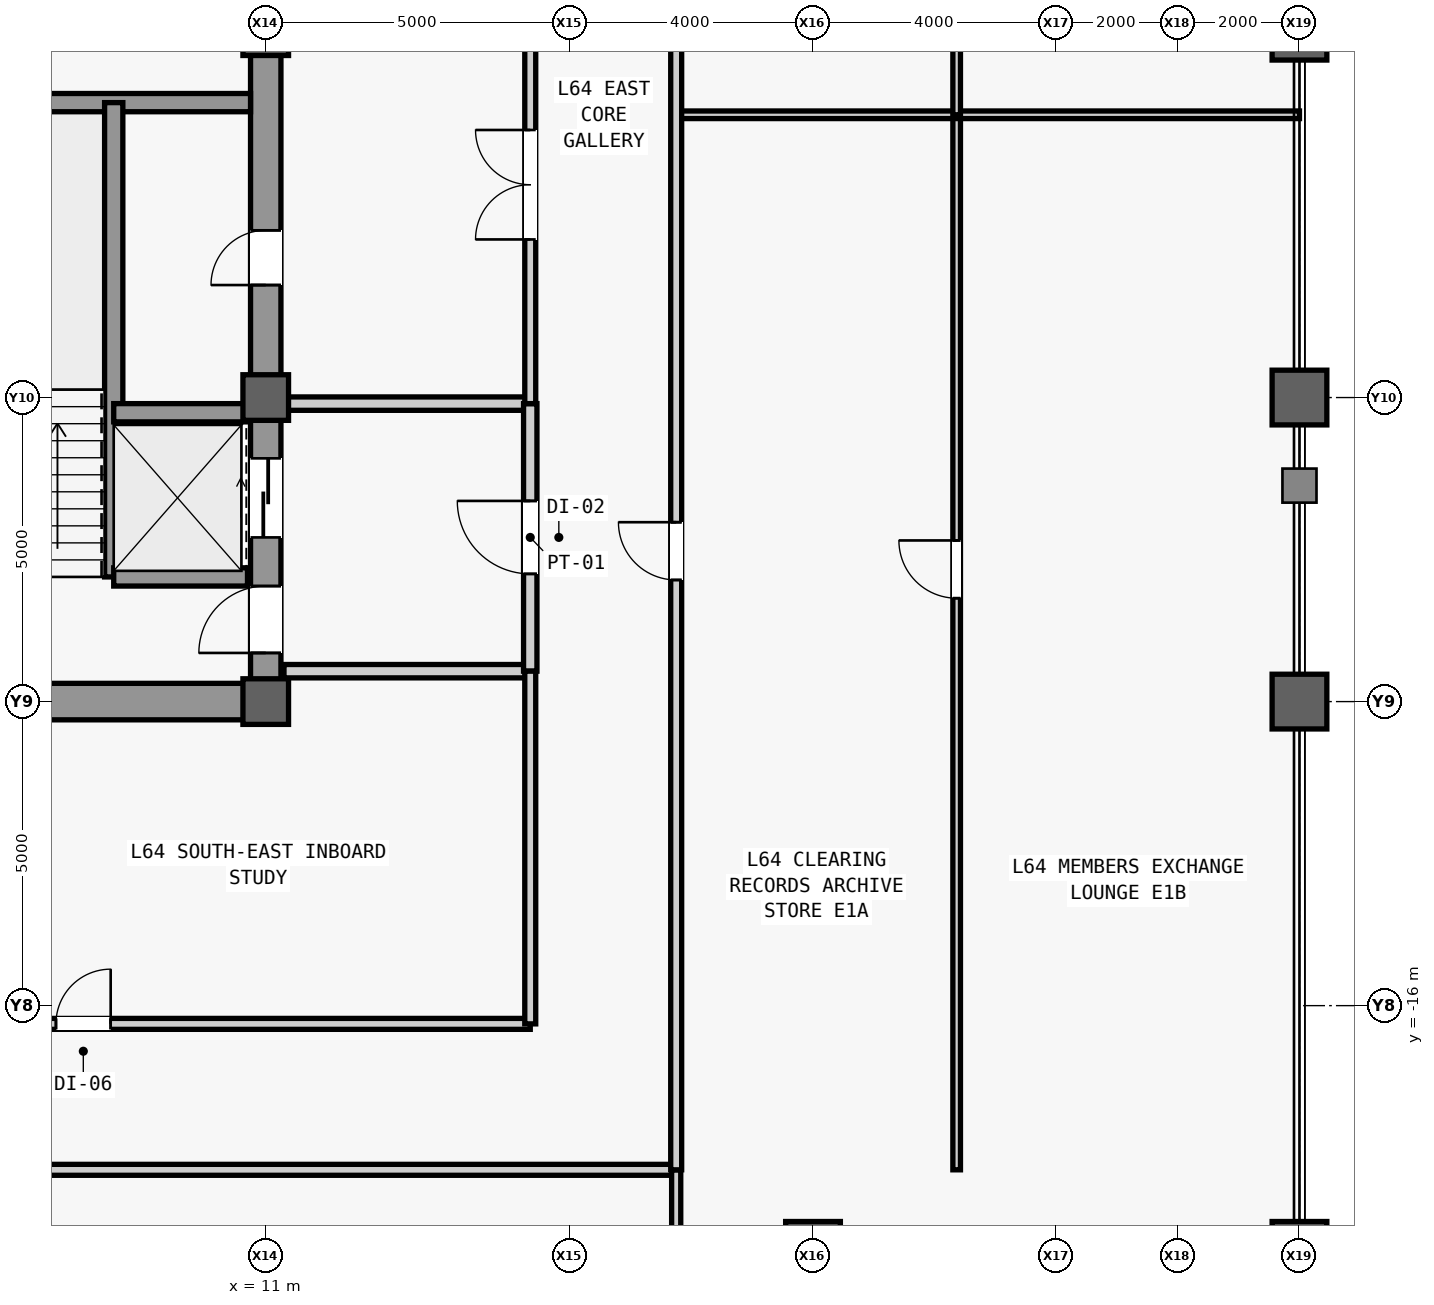
"""IFC4 building model, lengths in metres.
Left out: names, types, materials, properties, quantities, classifications, styles, units other than length and angle.
Written with IfcOpenShell. Run it as: python <this file> out.ifc"""

import sys

from ifc_helpers import new_model, si_unit, direction, frame, frame_2d, origin, origin_2d, place, context, subcontext, project, spatial, rectangle, hollow_rectangle, extrude, source, transform, mapped, element, fill, save


model = new_model("IFC4")
c1 = context("Model", 3, precision=1e-05, world=origin(), true_north=direction((0.0, 1.0)))
c2 = subcontext(c1, "Body", "Model", "MODEL_VIEW")
j1 = project(units=[si_unit("LENGTHUNIT", "METRE"), si_unit("PLANEANGLEUNIT", "RADIAN")], contexts=[c1])
p1 = place(None, origin())
s1 = spatial("IfcSite", under=j1, at=p1, CompositionType="ELEMENT")
p2 = place(p1, origin())
s2 = spatial("IfcBuilding", under=s1, at=p2, CompositionType="ELEMENT")
p3 = place(p2, frame((0.0, 0.0, 273.5)))
s3 = spatial("IfcBuildingStorey", under=s2, at=p3, CompositionType="ELEMENT", Elevation=273.5)
m1 = source(origin(), c2, "Body", "SweptSolid", [
    extrude(rectangle(XDim=22.0, YDim=0.5, at=frame_2d((11.0, 0.0))), origin(), (0.0, 0.0, 1.0), 3.78),
])
p4 = place(p3, frame((11.0, -11.0, 0.0), z_axis=(0.0, 0.0, 1.0), x_axis=(0.0, 1.0, 0.0)))
e1 = element("IfcWall", 1, at=p4, inside=s3, PredefinedType="SHEAR", context=c2, shape_type="MappedRepresentation", body=[
    mapped(m1, transform((0.0, 0.0, 0.0), scale=1.0)),
])
m2 = source(origin(), c2, "Body", "SweptSolid", [
    extrude(rectangle(XDim=1.1, YDim=2.2, at=frame_2d((0.55, 1.1))), frame((0.0, 0.26, 0.0), z_axis=(0.0, -1.0, 0.0), x_axis=(1.0, 0.0, 0.0)), (0.0, 0.0, 1.0), 0.52),
])
p5 = place(p4, frame((0.8, 0.0, 0.0)))
e2 = element("IfcOpeningElement", 2, at=p5, cuts=e1, PredefinedType="OPENING", context=c2, shape_type="MappedRepresentation", body=[
    mapped(m2, transform((0.0, 0.0, 0.0), scale=1.0)),
])
m3 = source(origin(), c2, "Body", "SweptSolid", [
    extrude(rectangle(XDim=0.9, YDim=2.15, at=frame_2d((0.45, 1.075))), frame((0.0, 0.26, 0.0), z_axis=(0.0, -1.0, 0.0), x_axis=(1.0, 0.0, 0.0)), (0.0, 0.0, 1.0), 0.52),
])
p6 = place(p4, frame((6.85, 0.0, 0.0)))
e3 = element("IfcOpeningElement", 3, at=p6, cuts=e1, PredefinedType="OPENING", context=c2, shape_type="MappedRepresentation", body=[
    mapped(m3, transform((0.0, 0.0, 0.0), scale=1.0)),
])
m4 = source(origin(), c2, "Body", "SweptSolid", [
    extrude(rectangle(XDim=1.2, YDim=2.3, at=frame_2d((0.6, 1.15))), frame((0.0, 0.26, 0.0), z_axis=(0.0, -1.0, 0.0), x_axis=(1.0, 0.0, 0.0)), (0.0, 0.0, 1.0), 0.52),
])
p7 = place(p4, frame((17.6, 0.0, 0.0)))
e4 = element("IfcOpeningElement", 4, at=p7, cuts=e1, PredefinedType="OPENING", context=c2, shape_type="MappedRepresentation", body=[
    mapped(m4, transform((0.0, 0.0, 0.0), scale=1.0)),
])
p8 = place(p4, frame((19.6, 0.0, 0.0)))
e5 = element("IfcOpeningElement", 5, at=p8, cuts=e1, PredefinedType="OPENING", context=c2, shape_type="MappedRepresentation", body=[
    mapped(m4, transform((0.0, 0.0, 0.0), scale=1.0)),
])
m5 = source(origin(), c2, "Body", "SweptSolid", [
    extrude(rectangle(XDim=1.3, YDim=2.3, at=frame_2d((0.65, 1.15))), frame((0.0, 0.26, 0.0), z_axis=(0.0, -1.0, 0.0), x_axis=(1.0, 0.0, 0.0)), (0.0, 0.0, 1.0), 0.52),
])
p9 = place(p4, frame((2.7, 0.0, 0.0)))
e6 = element("IfcOpeningElement", 6, at=p9, cuts=e1, PredefinedType="OPENING", context=c2, shape_type="MappedRepresentation", body=[
    mapped(m5, transform((0.0, 0.0, 0.0), scale=1.0)),
])
p10 = place(p4, frame((13.35, 0.0, 0.0)))
e7 = element("IfcOpeningElement", 7, at=p10, cuts=e1, PredefinedType="OPENING", context=c2, shape_type="MappedRepresentation", body=[
    mapped(m5, transform((0.0, 0.0, 0.0), scale=1.0)),
])
m6 = source(origin(), c2, "Body", "SweptSolid", [
    extrude(rectangle(XDim=5.9, YDim=0.6, at=frame_2d((2.95, 0.0))), origin(), (0.0, 0.0, 1.0), 3.78),
])
p11 = place(p3, frame((4.85, -11.0, 0.0), z_axis=(0.0, 0.0, 1.0), x_axis=(1.0, 0.0, 0.0)))
e8 = element("IfcWall", 8, at=p11, inside=s3, PredefinedType="SHEAR", context=c2, shape_type="MappedRepresentation", body=[
    mapped(m6, transform((0.0, 0.0, 0.0), scale=1.0)),
])
m7 = source(origin(), c2, "Body", "SweptSolid", [
    extrude(rectangle(XDim=5.65, YDim=0.3, at=frame_2d((2.825, 0.0))), origin(), (0.0, 0.0, 1.0), 3.78),
])
p12 = place(p3, frame((5.1, -1.15, 0.0), z_axis=(0.0, 0.0, 1.0), x_axis=(1.0, 0.0, 0.0)))
e9 = element("IfcWall", 9, at=p12, inside=s3, PredefinedType="SHEAR", context=c2, shape_type="MappedRepresentation", body=[
    mapped(m7, transform((0.0, 0.0, 0.0), scale=1.0)),
])
m8 = source(origin(), c2, "Body", "SweptSolid", [
    extrude(rectangle(XDim=0.75, YDim=0.75, at=origin_2d()), origin(), (0.0, 0.0, 1.0), 4.0),
])
for number, where, z_axis, x_axis in (
    (10, (11.0, -11.0, 0.0), (0.0, 0.0, 1.0), (1.0, 0.0, 0.0)),
    (11, (11.0, -6.0, 0.0), (0.0, 0.0, 1.0), (1.0, 0.0, 0.0)),
    (12, (11.0, 0.0, 0.0), (0.0, 0.0, 1.0), (1.0, 0.0, 0.0)),
):
    element("IfcColumn", number, at=place(p3, frame(where, z_axis=z_axis, x_axis=x_axis)), inside=s3, PredefinedType="COLUMN", context=c2, shape_type="MappedRepresentation", body=[
        mapped(m8, transform((0.0, 0.0, 0.0), scale=1.0)),
    ])
m9 = source(origin(), c2, "Body", "SweptSolid", [
    extrude(hollow_rectangle(XDim=0.9, YDim=0.9, WallThickness=0.05, at=origin_2d()), origin(), (0.0, 0.0, 1.0), 4.0),
])
for number, where, z_axis, x_axis in (
    (13, (20.0, -20.0, 0.0), (0.0, 0.0, 1.0), (1.0, 0.0, 0.0)),
    (14, (28.0, -20.0, 0.0), (0.0, 0.0, 1.0), (1.0, 0.0, 0.0)),
    (15, (28.0, -11.0, 0.0), (0.0, 0.0, 1.0), (1.0, 0.0, 0.0)),
    (16, (28.0, -6.0, 0.0), (0.0, 0.0, 1.0), (1.0, 0.0, 0.0)),
    (17, (28.0, 0.0, 0.0), (0.0, 0.0, 1.0), (1.0, 0.0, 0.0)),
):
    element("IfcColumn", number, at=place(p3, frame(where, z_axis=z_axis, x_axis=x_axis)), inside=s3, PredefinedType="COLUMN", context=c2, shape_type="MappedRepresentation", body=[
        mapped(m9, transform((0.0, 0.0, 0.0), scale=1.0)),
    ])
m10 = source(origin(), c2, "Body", "SweptSolid", [
    extrude(rectangle(XDim=7.8, YDim=0.3, at=frame_2d((3.9, 0.0))), origin(), (0.0, 0.0, 1.0), 3.78),
])
p13 = place(p3, frame((8.5, -8.95, 0.0), z_axis=(0.0, 0.0, 1.0), x_axis=(0.0, 1.0, 0.0)))
e18 = element("IfcWall", 18, at=p13, inside=s3, PredefinedType="SHEAR", context=c2, shape_type="MappedRepresentation", body=[
    mapped(m10, transform((0.0, 0.0, 0.0), scale=1.0)),
])
m11 = source(origin(), c2, "Body", "SweptSolid", [
    extrude(rectangle(XDim=2.2, YDim=0.3, at=frame_2d((1.1, 0.0))), origin(), (0.0, 0.0, 1.0), 3.78),
])
for number, where, z_axis, x_axis in (
    (19, (8.5, -8.95, 0.0), (0.0, 0.0, 1.0), (1.0, 0.0, 0.0)),
    (20, (8.5, -6.25, 0.0), (0.0, 0.0, 1.0), (1.0, 0.0, 0.0)),
):
    element("IfcWall", number, at=place(p3, frame(where, z_axis=z_axis, x_axis=x_axis)), inside=s3, PredefinedType="SHEAR", context=c2, shape_type="MappedRepresentation", body=[
        mapped(m11, transform((0.0, 0.0, 0.0), scale=1.0)),
    ])
m12 = source(origin(), c2, "Body", "SweptSolid", [
    extrude(rectangle(XDim=4.05, YDim=0.22, at=frame_2d((2.025, 0.0))), origin(), (0.0, 0.0, 1.0), 3.78),
])
p14 = place(p3, frame((11.3, -10.5, 0.0), z_axis=(0.0, 0.0, 1.0), x_axis=(1.0, 0.0, 0.0)))
e21 = element("IfcWall", 21, at=p14, inside=s3, PredefinedType="PARTITIONING", context=c2, shape_type="MappedRepresentation", body=[
    mapped(m12, transform((0.0, 0.0, 0.0), scale=1.0)),
])
m13 = source(origin(), c2, "Body", "SweptSolid", [
    extrude(rectangle(XDim=4.05, YDim=0.22, at=frame_2d((2.025, 0.0))), origin(), (0.0, 0.0, 1.0), 3.085),
])
p15 = place(p3, frame((11.3, -6.1, 0.0), z_axis=(0.0, 0.0, 1.0), x_axis=(1.0, 0.0, 0.0)))
e22 = element("IfcWall", 22, at=p15, inside=s3, PredefinedType="PARTITIONING", context=c2, shape_type="MappedRepresentation", body=[
    mapped(m13, transform((0.0, 0.0, 0.0), scale=1.0)),
])
m14 = source(origin(), c2, "Body", "SweptSolid", [
    extrude(rectangle(XDim=4.4, YDim=0.22, at=frame_2d((2.2, 0.0))), origin(), (0.0, 0.0, 1.0), 3.78),
])
p16 = place(p3, frame((15.35, -10.5, 0.0), z_axis=(0.0, 0.0, 1.0), x_axis=(0.0, 1.0, 0.0)))
e23 = element("IfcWall", 23, at=p16, inside=s3, PredefinedType="PARTITIONING", context=c2, shape_type="MappedRepresentation", body=[
    mapped(m14, transform((0.0, 0.0, 0.0), scale=1.0)),
])
m15 = source(origin(), c2, "Body", "SweptSolid", [
    extrude(rectangle(XDim=1.2, YDim=2.2, at=frame_2d((0.6, 1.1))), frame((0.0, 0.12, 0.0), z_axis=(0.0, -1.0, 0.0), x_axis=(1.0, 0.0, 0.0)), (0.0, 0.0, 1.0), 0.24),
])
p17 = place(p16, frame((1.6, 0.0, 0.0)))
e24 = element("IfcOpeningElement", 24, at=p17, cuts=e23, PredefinedType="OPENING", context=c2, shape_type="MappedRepresentation", body=[
    mapped(m15, transform((0.0, 0.0, 0.0), scale=1.0)),
])
m16 = source(origin(), c2, "Body", "SweptSolid", [
    extrude(rectangle(XDim=16.6, YDim=0.18, at=frame_2d((8.3, 0.0))), origin(), (0.0, 0.0, 1.0), 3.78),
])
p18 = place(p3, frame((15.35, -6.1, 0.0), z_axis=(0.0, 0.0, 1.0), x_axis=(0.0, 1.0, 0.0)))
e25 = element("IfcWall", 25, at=p18, inside=s3, PredefinedType="PARTITIONING", context=c2, shape_type="MappedRepresentation", body=[
    mapped(m16, transform((0.0, 0.0, 0.0), scale=1.0)),
])
m17 = source(origin(), c2, "Body", "SweptSolid", [
    extrude(rectangle(XDim=1.8, YDim=2.25, at=frame_2d((0.9, 1.125))), frame((0.0, 0.1, 0.0), z_axis=(0.0, -1.0, 0.0), x_axis=(1.0, 0.0, 0.0)), (0.0, 0.0, 1.0), 0.2),
])
p19 = place(p18, frame((2.7, 0.0, 0.0)))
e26 = element("IfcOpeningElement", 26, at=p19, cuts=e25, PredefinedType="OPENING", context=c2, shape_type="MappedRepresentation", body=[
    mapped(m17, transform((0.0, 0.0, 0.0), scale=1.0)),
])
p20 = place(p18, frame((13.0, 0.0, 0.0)))
e27 = element("IfcOpeningElement", 27, at=p20, cuts=e25, PredefinedType="OPENING", context=c2, shape_type="MappedRepresentation", body=[
    mapped(m17, transform((0.0, 0.0, 0.0), scale=1.0)),
])
m18 = source(origin(), c2, "Body", "SweptSolid", [
    extrude(rectangle(XDim=14.05, YDim=0.18, at=frame_2d((7.025, 0.0))), origin(), (0.0, 0.0, 1.0), 3.78),
])
p21 = place(p3, frame((1.3, -16.3, 0.0), z_axis=(0.0, 0.0, 1.0), x_axis=(1.0, 0.0, 0.0)))
e28 = element("IfcWall", 28, at=p21, inside=s3, PredefinedType="PARTITIONING", context=c2, shape_type="MappedRepresentation", body=[
    mapped(m18, transform((0.0, 0.0, 0.0), scale=1.0)),
])
m19 = source(origin(), c2, "Body", "SweptSolid", [
    extrude(rectangle(XDim=0.9, YDim=2.15, at=frame_2d((0.45, 1.075))), frame((0.0, 0.1, 0.0), z_axis=(0.0, -1.0, 0.0), x_axis=(1.0, 0.0, 0.0)), (0.0, 0.0, 1.0), 0.2),
])
p22 = place(p21, frame((6.25, 0.0, 0.0)))
e29 = element("IfcOpeningElement", 29, at=p22, cuts=e28, PredefinedType="OPENING", context=c2, shape_type="MappedRepresentation", body=[
    mapped(m19, transform((0.0, 0.0, 0.0), scale=1.0)),
])
m20 = source(origin(), c2, "Body", "SweptSolid", [
    extrude(rectangle(XDim=5.8, YDim=0.18, at=frame_2d((2.9, 0.0))), origin(), (0.0, 0.0, 1.0), 3.78),
])
p23 = place(p3, frame((15.35, -16.3, 0.0), z_axis=(0.0, 0.0, 1.0), x_axis=(0.0, 1.0, 0.0)))
e30 = element("IfcWall", 30, at=p23, inside=s3, PredefinedType="PARTITIONING", context=c2, shape_type="MappedRepresentation", body=[
    mapped(m20, transform((0.0, 0.0, 0.0), scale=1.0)),
])
m21 = source(origin(), c2, "Body", "SweptSolid", [
    extrude(rectangle(XDim=37.55, YDim=0.18, at=frame_2d((18.775, 0.0))), origin(), (0.0, 0.0, 1.0), 3.78),
])
p24 = place(p3, frame((-19.8, -18.7, 0.0), z_axis=(0.0, 0.0, 1.0), x_axis=(1.0, 0.0, 0.0)))
e31 = element("IfcWall", 31, at=p24, inside=s3, PredefinedType="PARTITIONING", context=c2, shape_type="MappedRepresentation", body=[
    mapped(m21, transform((0.0, 0.0, 0.0), scale=1.0)),
])
m22 = source(origin(), c2, "Body", "SweptSolid", [
    extrude(rectangle(XDim=1.05, YDim=2.2, at=frame_2d((0.525, 1.1))), frame((0.0, 0.1, 0.0), z_axis=(0.0, -1.0, 0.0), x_axis=(1.0, 0.0, 0.0)), (0.0, 0.0, 1.0), 0.2),
])
p25 = place(p24, frame((7.11, 0.0, 0.0)))
e32 = element("IfcOpeningElement", 32, at=p25, cuts=e31, PredefinedType="OPENING", context=c2, shape_type="MappedRepresentation", body=[
    mapped(m22, transform((0.0, 0.0, 0.0), scale=1.0)),
])
p26 = place(p24, frame((24.86, 0.0, 0.0)))
e33 = element("IfcOpeningElement", 33, at=p26, cuts=e31, PredefinedType="OPENING", context=c2, shape_type="MappedRepresentation", body=[
    mapped(m22, transform((0.0, 0.0, 0.0), scale=1.0)),
])
m23 = source(origin(), c2, "Body", "SweptSolid", [
    extrude(rectangle(XDim=9.3, YDim=0.15, at=frame_2d((4.65, 0.0))), origin(), (0.0, 0.0, 1.0), 3.78),
])
p27 = place(p3, frame((17.75, -28.0, 0.0), z_axis=(0.0, 0.0, 1.0), x_axis=(0.0, 1.0, 0.0)))
e34 = element("IfcWall", 34, at=p27, inside=s3, PredefinedType="PARTITIONING", context=c2, shape_type="MappedRepresentation", body=[
    mapped(m23, transform((0.0, 0.0, 0.0), scale=1.0)),
])
m24 = source(origin(), c2, "Body", "SweptSolid", [
    extrude(rectangle(XDim=17.35, YDim=0.125, at=frame_2d((8.675, 0.0))), origin(), (0.0, 0.0, 1.0), 3.164),
])
p28 = place(p3, frame((22.363, -18.7, 0.0), z_axis=(0.0, 0.0, 1.0), x_axis=(0.0, 1.0, 0.0)))
e35 = element("IfcWall", 35, at=p28, inside=s3, PredefinedType="PARTITIONING", context=c2, shape_type="MappedRepresentation", body=[
    mapped(m24, transform((0.0, 0.0, 0.0), scale=1.0)),
])
m25 = source(origin(), c2, "Body", "SweptSolid", [
    extrude(rectangle(XDim=0.95, YDim=2.15, at=frame_2d((0.475, 1.075))), frame((0.0, 0.073, 0.0), z_axis=(0.0, -1.0, 0.0), x_axis=(1.0, 0.0, 0.0)), (0.0, 0.0, 1.0), 0.145),
])
p29 = place(p28, frame((9.4, 0.0, 0.0)))
e36 = element("IfcOpeningElement", 36, at=p29, cuts=e35, PredefinedType="OPENING", context=c2, shape_type="MappedRepresentation", body=[
    mapped(m25, transform((0.0, 0.0, 0.0), scale=1.0)),
])
m26 = source(origin(), c2, "Body", "SweptSolid", [
    extrude(rectangle(XDim=10.25, YDim=0.125, at=frame_2d((5.125, 0.0))), origin(), (0.0, 0.0, 1.0), 3.78),
])
p30 = place(p3, frame((17.75, -1.35, 0.0), z_axis=(0.0, 0.0, 1.0), x_axis=(1.0, 0.0, 0.0)))
e37 = element("IfcWall", 37, at=p30, inside=s3, PredefinedType="PARTITIONING", context=c2, shape_type="MappedRepresentation", body=[
    mapped(m26, transform((0.0, 0.0, 0.0), scale=1.0)),
])
m27 = source(origin(), c2, "Body", "SweptSolid", [
    extrude(rectangle(XDim=23.85, YDim=0.125, at=frame_2d((11.925, 0.0))), origin(), (0.0, 0.0, 1.0), 3.164),
])
p31 = place(p3, frame((22.363, -1.35, 0.0), z_axis=(0.0, 0.0, 1.0), x_axis=(0.0, 1.0, 0.0)))
e38 = element("IfcWall", 38, at=p31, inside=s3, PredefinedType="PARTITIONING", context=c2, shape_type="MappedRepresentation", body=[
    mapped(m27, transform((0.0, 0.0, 0.0), scale=1.0)),
])
p32 = place(p31, frame((7.0, 0.0, 0.0)))
e39 = element("IfcOpeningElement", 39, at=p32, cuts=e38, PredefinedType="OPENING", context=c2, shape_type="MappedRepresentation", body=[
    mapped(m25, transform((0.0, 0.0, 0.0), scale=1.0)),
])
m28 = source(origin(), c2, "Body", "SweptSolid", [
    extrude(rectangle(XDim=41.2, YDim=0.18, at=frame_2d((20.6, 0.0))), origin(), (0.0, 0.0, 1.0), 3.78),
])
p33 = place(p3, frame((17.75, -18.7, 0.0), z_axis=(0.0, 0.0, 1.0), x_axis=(0.0, 1.0, 0.0)))
e40 = element("IfcWall", 40, at=p33, inside=s3, PredefinedType="PARTITIONING", context=c2, shape_type="MappedRepresentation", body=[
    mapped(m28, transform((0.0, 0.0, 0.0), scale=1.0)),
])
m29 = source(origin(), c2, "Body", "SweptSolid", [
    extrude(rectangle(XDim=0.95, YDim=2.15, at=frame_2d((0.475, 1.075))), frame((0.0, 0.1, 0.0), z_axis=(0.0, -1.0, 0.0), x_axis=(1.0, 0.0, 0.0)), (0.0, 0.0, 1.0), 0.2),
])
p34 = place(p33, frame((9.7, 0.0, 0.0)))
e41 = element("IfcOpeningElement", 41, at=p34, cuts=e40, PredefinedType="OPENING", context=c2, shape_type="MappedRepresentation", body=[
    mapped(m29, transform((0.0, 0.0, 0.0), scale=1.0)),
])
p35 = place(p33, frame((24.05, 0.0, 0.0)))
e42 = element("IfcOpeningElement", 42, at=p35, cuts=e40, PredefinedType="OPENING", context=c2, shape_type="MappedRepresentation", body=[
    mapped(m29, transform((0.0, 0.0, 0.0), scale=1.0)),
])
m30 = source(origin(), c2, "Body", "SweptSolid", [
    extrude(rectangle(XDim=1.1, YDim=2.2, at=frame_2d((0.55, 1.1))), frame((0.0, 0.025, 0.0), z_axis=(0.0, -1.0, 0.0), x_axis=(1.0, 0.0, 0.0)), (0.0, 0.0, 1.0), 0.05),
])
p36 = place(p5, origin())
e43 = element("IfcDoor", 43, at=p36, inside=s3, OperationType="SINGLE_SWING_LEFT", PredefinedType="DOOR", context=c2, shape_type="MappedRepresentation", body=[
    mapped(m30, transform((0.0, 0.0, 0.0), scale=1.0)),
])
fill(e2, e43)
m31 = source(origin(), c2, "Body", "SweptSolid", [
    extrude(rectangle(XDim=0.9, YDim=2.15, at=frame_2d((0.45, 1.075))), frame((0.0, 0.025, 0.0), z_axis=(0.0, -1.0, 0.0), x_axis=(1.0, 0.0, 0.0)), (0.0, 0.0, 1.0), 0.05),
])
p37 = place(p6, origin())
e44 = element("IfcDoor", 44, at=p37, inside=s3, OperationType="SINGLE_SWING_LEFT", PredefinedType="DOOR", context=c2, shape_type="MappedRepresentation", body=[
    mapped(m31, transform((0.0, 0.0, 0.0), scale=1.0)),
])
fill(e3, e44)
m32 = source(origin(), c2, "Body", "SweptSolid", [
    extrude(rectangle(XDim=1.2, YDim=2.2, at=frame_2d((0.6, 1.1))), frame((0.0, 0.025, 0.0), z_axis=(0.0, -1.0, 0.0), x_axis=(1.0, 0.0, 0.0)), (0.0, 0.0, 1.0), 0.05),
])
p38 = place(p17, origin())
e45 = element("IfcDoor", 45, at=p38, inside=s3, OperationType="SINGLE_SWING_RIGHT", PredefinedType="DOOR", context=c2, shape_type="MappedRepresentation", body=[
    mapped(m32, transform((0.0, 0.0, 0.0), scale=1.0)),
])
fill(e24, e45)
m33 = source(origin(), c2, "Body", "SweptSolid", [
    extrude(rectangle(XDim=1.8, YDim=2.25, at=frame_2d((0.9, 1.125))), frame((0.0, 0.025, 0.0), z_axis=(0.0, -1.0, 0.0), x_axis=(1.0, 0.0, 0.0)), (0.0, 0.0, 1.0), 0.05),
])
p39 = place(p19, origin())
e46 = element("IfcDoor", 46, at=p39, inside=s3, OperationType="SINGLE_SWING_RIGHT", PredefinedType="DOOR", context=c2, shape_type="MappedRepresentation", body=[
    mapped(m33, transform((0.0, 0.0, 0.0), scale=1.0)),
])
fill(e26, e46)
p40 = place(p22, origin())
e47 = element("IfcDoor", 47, at=p40, inside=s3, OperationType="SINGLE_SWING_RIGHT", PredefinedType="DOOR", context=c2, shape_type="MappedRepresentation", body=[
    mapped(m31, transform((0.0, 0.0, 0.0), scale=1.0)),
])
fill(e29, e47)
m34 = source(origin(), c2, "Body", "SweptSolid", [
    extrude(rectangle(XDim=0.95, YDim=2.15, at=frame_2d((0.475, 1.075))), frame((0.0, 0.025, 0.0), z_axis=(0.0, -1.0, 0.0), x_axis=(1.0, 0.0, 0.0)), (0.0, 0.0, 1.0), 0.05),
])
p41 = place(p29, origin())
e48 = element("IfcDoor", 48, at=p41, inside=s3, OperationType="SINGLE_SWING_RIGHT", PredefinedType="DOOR", context=c2, shape_type="MappedRepresentation", body=[
    mapped(m34, transform((0.0, 0.0, 0.0), scale=1.0)),
])
fill(e36, e48)
p42 = place(p34, origin())
e49 = element("IfcDoor", 49, at=p42, inside=s3, OperationType="SINGLE_SWING_RIGHT", PredefinedType="DOOR", context=c2, shape_type="MappedRepresentation", body=[
    mapped(m34, transform((0.0, 0.0, 0.0), scale=1.0)),
])
fill(e41, e49)
m35 = source(origin(), c2, "Body", "SweptSolid", [
    extrude(rectangle(XDim=1.3, YDim=2.3, at=frame_2d((0.65, 1.15))), frame((0.0, 0.025, 0.0), z_axis=(0.0, -1.0, 0.0), x_axis=(1.0, 0.0, 0.0)), (0.0, 0.0, 1.0), 0.05),
])
p43 = place(p9, origin())
e50 = element("IfcDoor", 50, at=p43, inside=s3, OperationType="SLIDING_TO_LEFT", PredefinedType="DOOR", context=c2, shape_type="MappedRepresentation", body=[
    mapped(m35, transform((0.0, 0.0, 0.0), scale=1.0)),
])
fill(e6, e50)
save(model, sys.argv[1])
